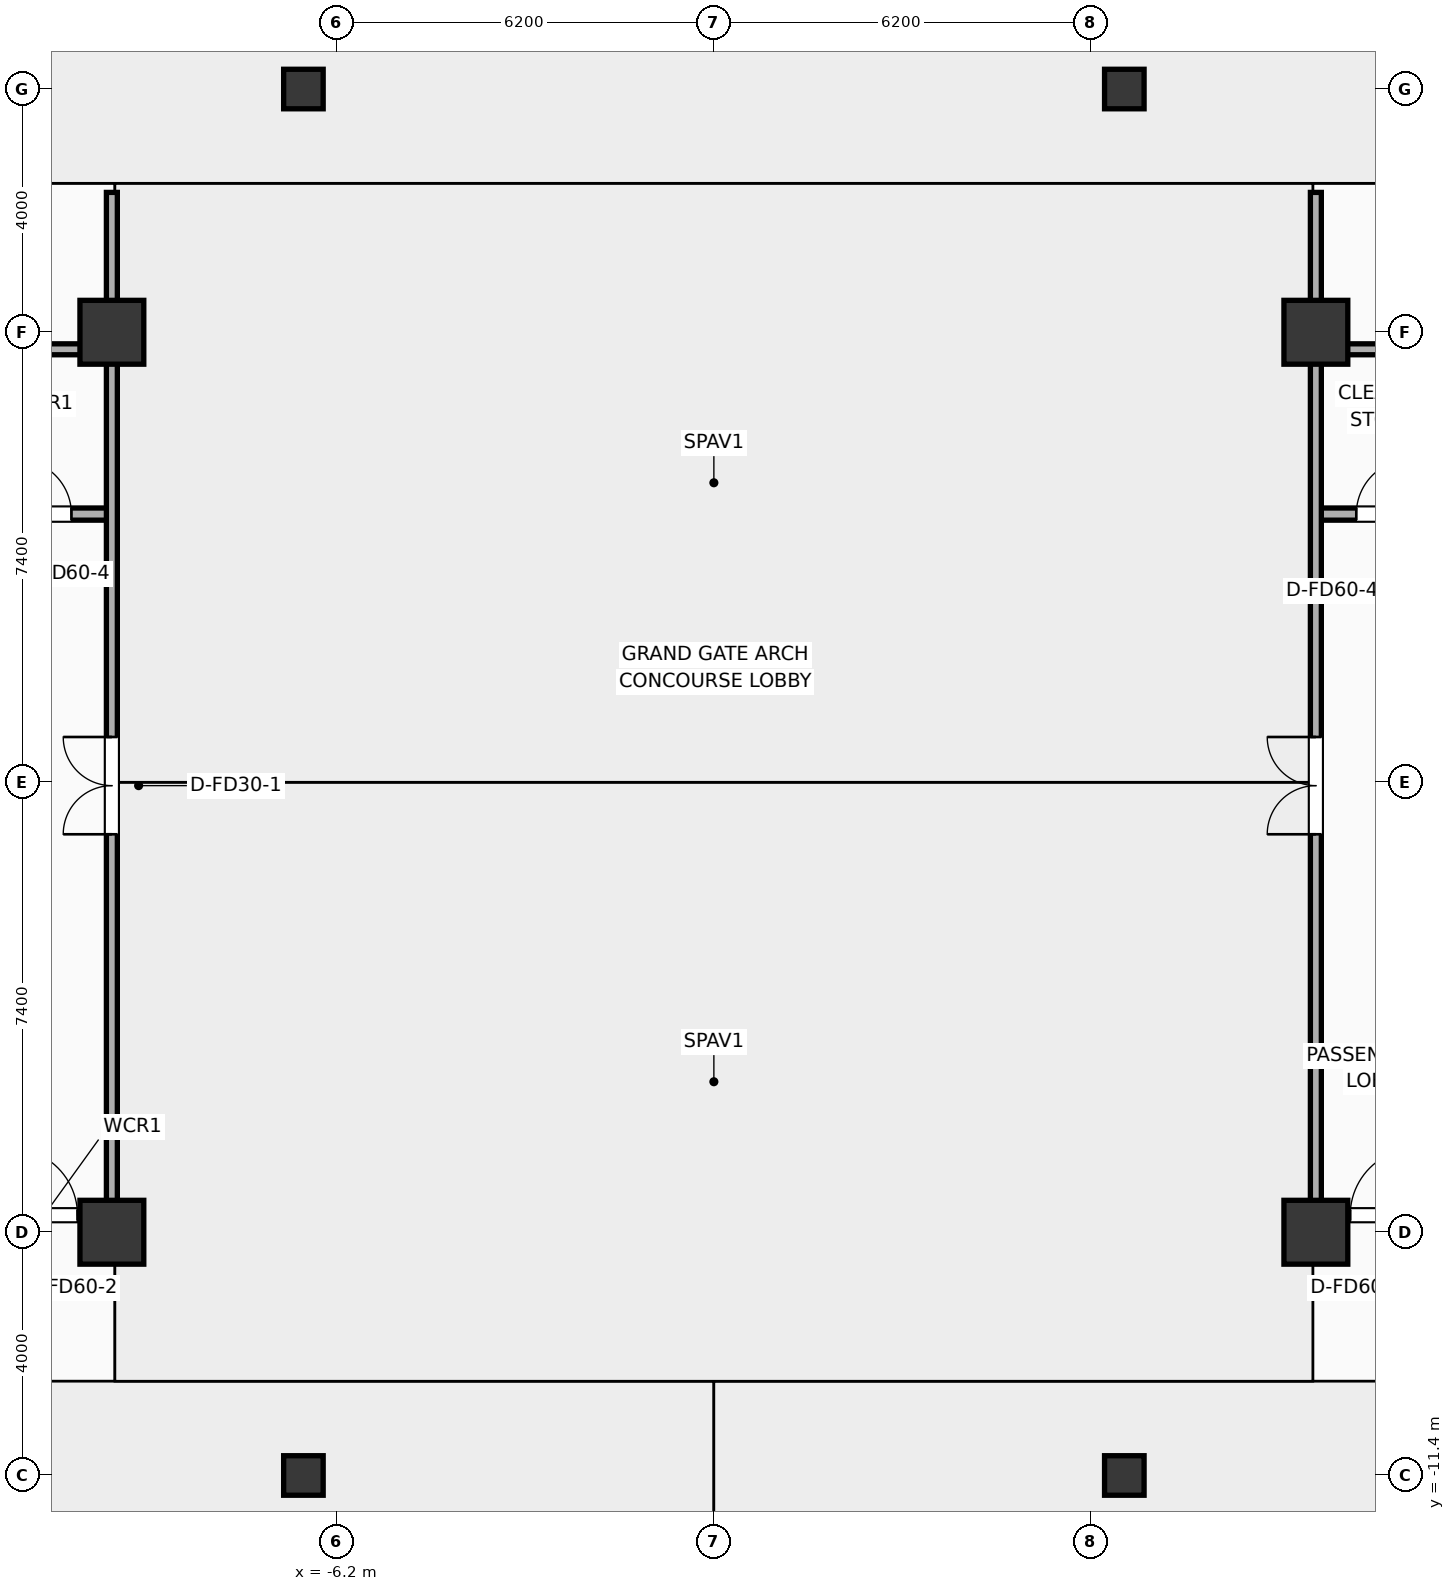
"""IFC4 building model, lengths in metres.
Left out: names, types, materials, properties, quantities, classifications, styles, units other than length and angle.
Written with IfcOpenShell. Run it as: python <this file> out.ifc"""

import sys

from ifc_helpers import new_model, si_unit, direction, frame, frame_2d, origin, origin_2d, place, context, subcontext, project, spatial, rectangle, hollow_rectangle, extrude, element, fill, save


model = new_model("IFC4")
c1 = context("Model", 3, precision=1e-05, world=origin(), true_north=direction((0.0, 1.0)))
c2 = subcontext(c1, "Body", "Model", "MODEL_VIEW")
j1 = project(units=[si_unit("LENGTHUNIT", "METRE"), si_unit("PLANEANGLEUNIT", "RADIAN")], contexts=[c1])
p1 = place(None, origin())
s1 = spatial("IfcSite", under=j1, at=p1, CompositionType="ELEMENT")
p2 = place(p1, origin())
s2 = spatial("IfcBuilding", under=s1, at=p2, CompositionType="ELEMENT")
p3 = place(p2, origin())
s3 = spatial("IfcBuildingStorey", under=s2, at=p3, CompositionType="ELEMENT", Elevation=0.0)
for number, where, z_axis, x_axis in (
    (1, (-9.9, -7.4, 0.0), (0.0, 0.0, 1.0), (1.0, 0.0, 0.0)),
    (2, (-9.9, 7.4, 0.0), (0.0, 0.0, 1.0), (1.0, 0.0, 0.0)),
    (3, (9.9, -7.4, 0.0), (0.0, 0.0, 1.0), (1.0, 0.0, 0.0)),
    (4, (9.9, 7.4, 0.0), (0.0, 0.0, 1.0), (1.0, 0.0, 0.0)),
):
    element("IfcColumn", number, at=place(p3, frame(where, z_axis=z_axis, x_axis=x_axis)), inside=s3, PredefinedType="COLUMN", context=c2, shape_type="SweptSolid", body=[
        extrude(rectangle(XDim=1.05, YDim=1.05, at=origin_2d()), origin(), (0.0, 0.0, 1.0), 5.2),
    ])
for number, where, z_axis, x_axis in (
    (5, (-6.75, -11.4, 0.0), (0.0, 0.0, 1.0), (1.0, 0.0, 0.0)),
    (6, (-6.75, 11.4, 0.0), (0.0, 0.0, 1.0), (1.0, 0.0, 0.0)),
    (7, (6.75, -11.4, 0.0), (0.0, 0.0, 1.0), (1.0, 0.0, 0.0)),
    (8, (6.75, 11.4, 0.0), (0.0, 0.0, 1.0), (1.0, 0.0, 0.0)),
):
    element("IfcColumn", number, at=place(p3, frame(where, z_axis=z_axis, x_axis=x_axis)), inside=s3, PredefinedType="COLUMN", context=c2, shape_type="SweptSolid", body=[
        extrude(hollow_rectangle(XDim=0.65, YDim=0.65, WallThickness=0.028, at=origin_2d()), origin(), (0.0, 0.0, 1.0), 5.2),
    ])
p4 = place(p3, frame((-12.15, 4.41, 0.0), z_axis=(0.0, 0.0, 1.0), x_axis=(1.0, 0.0, 0.0)))
e9 = element("IfcWall", 9, at=p4, inside=s3, PredefinedType="PARTITIONING", context=c2, shape_type="SweptSolid", body=[
    extrude(rectangle(XDim=2.27, YDim=0.2, at=frame_2d((1.135, 0.0))), origin(), (0.0, 0.0, 1.0), 4.92),
])
p5 = place(p4, frame((0.685, 0.0, 0.0)))
e10 = element("IfcOpeningElement", 10, at=p5, cuts=e9, PredefinedType="OPENING", context=c2, shape_type="SweptSolid", body=[
    extrude(rectangle(XDim=0.9, YDim=2.05, at=frame_2d((0.45, 1.025))), frame((0.0, 0.11, 0.0), z_axis=(0.0, -1.0, 0.0), x_axis=(1.0, 0.0, 0.0)), (0.0, 0.0, 1.0), 0.22),
])
p6 = place(p3, frame((-12.15, 7.12, 0.0), z_axis=(0.0, 0.0, 1.0), x_axis=(1.0, 0.0, 0.0)))
e11 = element("IfcWall", 11, at=p6, inside=s3, PredefinedType="PARTITIONING", context=c2, shape_type="SweptSolid", body=[
    extrude(rectangle(XDim=2.27, YDim=0.18, at=frame_2d((1.135, 0.0))), origin(), (0.0, 0.0, 1.0), 4.21),
])
p7 = place(p3, frame((-12.15, -7.12, 0.0), z_axis=(0.0, 0.0, 1.0), x_axis=(1.0, 0.0, 0.0)))
e12 = element("IfcWall", 12, at=p7, inside=s3, PredefinedType="PARTITIONING", context=c2, shape_type="SweptSolid", body=[
    extrude(rectangle(XDim=2.27, YDim=0.18, at=frame_2d((1.135, 0.0))), origin(), (0.0, 0.0, 1.0), 4.21),
])
p8 = place(p7, frame((0.585, 0.0, 0.0)))
e13 = element("IfcOpeningElement", 13, at=p8, cuts=e12, PredefinedType="OPENING", context=c2, shape_type="SweptSolid", body=[
    extrude(rectangle(XDim=1.1, YDim=2.05, at=frame_2d((0.55, 1.025))), frame((0.0, 0.1, 0.0), z_axis=(0.0, -1.0, 0.0), x_axis=(1.0, 0.0, 0.0)), (0.0, 0.0, 1.0), 0.2),
])
p9 = place(p3, frame((9.88, 4.41, 0.0), z_axis=(0.0, 0.0, 1.0), x_axis=(1.0, 0.0, 0.0)))
e14 = element("IfcWall", 14, at=p9, inside=s3, PredefinedType="PARTITIONING", context=c2, shape_type="SweptSolid", body=[
    extrude(rectangle(XDim=2.27, YDim=0.2, at=frame_2d((1.135, 0.0))), origin(), (0.0, 0.0, 1.0), 4.92),
])
p10 = place(p9, frame((0.685, 0.0, 0.0)))
e15 = element("IfcOpeningElement", 15, at=p10, cuts=e14, PredefinedType="OPENING", context=c2, shape_type="SweptSolid", body=[
    extrude(rectangle(XDim=0.9, YDim=2.05, at=frame_2d((0.45, 1.025))), frame((0.0, 0.11, 0.0), z_axis=(0.0, -1.0, 0.0), x_axis=(1.0, 0.0, 0.0)), (0.0, 0.0, 1.0), 0.22),
])
p11 = place(p3, frame((9.88, 7.12, 0.0), z_axis=(0.0, 0.0, 1.0), x_axis=(1.0, 0.0, 0.0)))
e16 = element("IfcWall", 16, at=p11, inside=s3, PredefinedType="PARTITIONING", context=c2, shape_type="SweptSolid", body=[
    extrude(rectangle(XDim=2.27, YDim=0.18, at=frame_2d((1.135, 0.0))), origin(), (0.0, 0.0, 1.0), 4.21),
])
p12 = place(p3, frame((9.88, -7.12, 0.0), z_axis=(0.0, 0.0, 1.0), x_axis=(1.0, 0.0, 0.0)))
e17 = element("IfcWall", 17, at=p12, inside=s3, PredefinedType="PARTITIONING", context=c2, shape_type="SweptSolid", body=[
    extrude(rectangle(XDim=2.27, YDim=0.18, at=frame_2d((1.135, 0.0))), origin(), (0.0, 0.0, 1.0), 4.21),
])
p13 = place(p12, frame((0.585, 0.0, 0.0)))
e18 = element("IfcOpeningElement", 18, at=p13, cuts=e17, PredefinedType="OPENING", context=c2, shape_type="SweptSolid", body=[
    extrude(rectangle(XDim=1.1, YDim=2.05, at=frame_2d((0.55, 1.025))), frame((0.0, 0.1, 0.0), z_axis=(0.0, -1.0, 0.0), x_axis=(1.0, 0.0, 0.0)), (0.0, 0.0, 1.0), 0.2),
])
p14 = place(p3, frame((-9.9, -7.12, 0.0), z_axis=(0.0, 0.0, 1.0), x_axis=(0.0, 1.0, 0.0)))
e19 = element("IfcWall", 19, at=p14, inside=s3, PredefinedType="PARTITIONING", context=c2, shape_type="SweptSolid", body=[
    extrude(rectangle(XDim=16.82, YDim=0.18, at=frame_2d((8.41, 0.0))), origin(), (0.0, 0.0, 1.0), 4.21),
])
p15 = place(p14, frame((6.264, 0.0, 0.0)))
e20 = element("IfcOpeningElement", 20, at=p15, cuts=e19, PredefinedType="OPENING", context=c2, shape_type="SweptSolid", body=[
    extrude(rectangle(XDim=1.6, YDim=2.05, at=frame_2d((0.8, 1.025))), frame((0.0, 0.1, 0.0), z_axis=(0.0, -1.0, 0.0), x_axis=(1.0, 0.0, 0.0)), (0.0, 0.0, 1.0), 0.2),
])
p16 = place(p3, frame((9.9, -7.12, 0.0), z_axis=(0.0, 0.0, 1.0), x_axis=(0.0, 1.0, 0.0)))
e21 = element("IfcWall", 21, at=p16, inside=s3, PredefinedType="PARTITIONING", context=c2, shape_type="SweptSolid", body=[
    extrude(rectangle(XDim=16.82, YDim=0.18, at=frame_2d((8.41, 0.0))), origin(), (0.0, 0.0, 1.0), 4.21),
])
p17 = place(p16, frame((6.264, 0.0, 0.0)))
e22 = element("IfcOpeningElement", 22, at=p17, cuts=e21, PredefinedType="OPENING", context=c2, shape_type="SweptSolid", body=[
    extrude(rectangle(XDim=1.6, YDim=2.05, at=frame_2d((0.8, 1.025))), frame((0.0, 0.1, 0.0), z_axis=(0.0, -1.0, 0.0), x_axis=(1.0, 0.0, 0.0)), (0.0, 0.0, 1.0), 0.2),
])
p18 = place(p5, origin())
e23 = element("IfcDoor", 23, at=p18, inside=s3, OperationType="SINGLE_SWING_LEFT", PredefinedType="DOOR", context=c2, shape_type="SweptSolid", body=[
    extrude(rectangle(XDim=0.9, YDim=2.05, at=frame_2d((0.45, 1.025))), frame((0.0, 0.025, 0.0), z_axis=(0.0, -1.0, 0.0), x_axis=(1.0, 0.0, 0.0)), (0.0, 0.0, 1.0), 0.05),
])
fill(e10, e23)
p19 = place(p8, origin())
e24 = element("IfcDoor", 24, at=p19, inside=s3, OperationType="SINGLE_SWING_LEFT", PredefinedType="DOOR", context=c2, shape_type="SweptSolid", body=[
    extrude(rectangle(XDim=1.1, YDim=2.05, at=frame_2d((0.55, 1.025))), frame((0.0, 0.025, 0.0), z_axis=(0.0, -1.0, 0.0), x_axis=(1.0, 0.0, 0.0)), (0.0, 0.0, 1.0), 0.05),
])
fill(e13, e24)
p20 = place(p10, origin())
e25 = element("IfcDoor", 25, at=p20, inside=s3, OperationType="SINGLE_SWING_RIGHT", PredefinedType="DOOR", context=c2, shape_type="SweptSolid", body=[
    extrude(rectangle(XDim=0.9, YDim=2.05, at=frame_2d((0.45, 1.025))), frame((0.0, 0.025, 0.0), z_axis=(0.0, -1.0, 0.0), x_axis=(1.0, 0.0, 0.0)), (0.0, 0.0, 1.0), 0.05),
])
fill(e15, e25)
p21 = place(p13, origin())
e26 = element("IfcDoor", 26, at=p21, inside=s3, OperationType="SINGLE_SWING_RIGHT", PredefinedType="DOOR", context=c2, shape_type="SweptSolid", body=[
    extrude(rectangle(XDim=1.1, YDim=2.05, at=frame_2d((0.55, 1.025))), frame((0.0, 0.025, 0.0), z_axis=(0.0, -1.0, 0.0), x_axis=(1.0, 0.0, 0.0)), (0.0, 0.0, 1.0), 0.05),
])
fill(e18, e26)
p22 = place(p15, origin())
e27 = element("IfcDoor", 27, at=p22, inside=s3, OperationType="DOUBLE_DOOR_SINGLE_SWING", PredefinedType="DOOR", context=c2, shape_type="SweptSolid", body=[
    extrude(rectangle(XDim=1.6, YDim=2.05, at=frame_2d((0.8, 1.025))), frame((0.0, 0.025, 0.0), z_axis=(0.0, -1.0, 0.0), x_axis=(1.0, 0.0, 0.0)), (0.0, 0.0, 1.0), 0.05),
])
fill(e20, e27)
p23 = place(p17, origin())
e28 = element("IfcDoor", 28, at=p23, inside=s3, OperationType="DOUBLE_DOOR_SINGLE_SWING", PredefinedType="DOOR", context=c2, shape_type="SweptSolid", body=[
    extrude(rectangle(XDim=1.6, YDim=2.05, at=frame_2d((0.8, 1.025))), frame((0.0, 0.025, 0.0), z_axis=(0.0, -1.0, 0.0), x_axis=(1.0, 0.0, 0.0)), (0.0, 0.0, 1.0), 0.05),
])
fill(e22, e28)
save(model, sys.argv[1])
